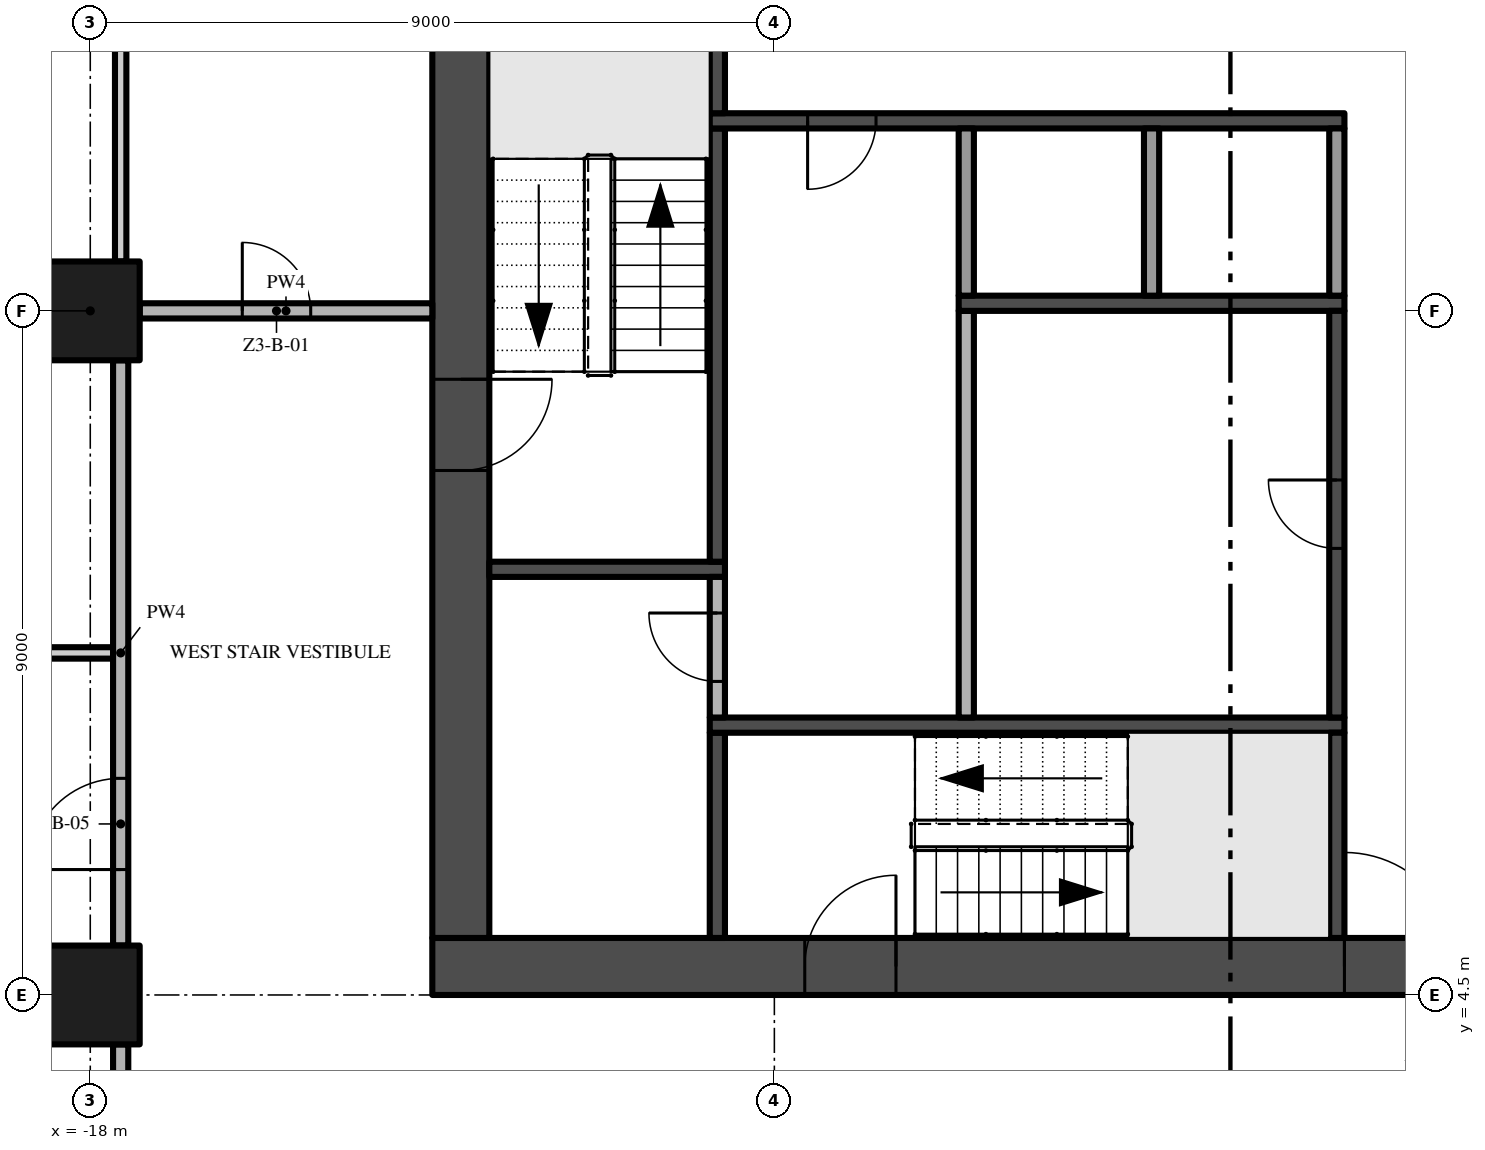
"""IFC4 building model, lengths in metres.
Left out: names, types, materials, properties, quantities, classifications, styles, units other than length and angle.
Written with IfcOpenShell. Run it as: python <this file> out.ifc"""

import sys

from ifc_helpers import new_model, si_unit, direction, frame, frame_2d, origin, origin_2d, place, context, subcontext, project, spatial, rectangle, extrude, element, fill, save


model = new_model("IFC4")
c1 = context("Model", 3, precision=1e-05, world=origin(), true_north=direction((0.0, 1.0)))
c2 = subcontext(c1, "Body", "Model", "MODEL_VIEW")
j1 = project(units=[si_unit("LENGTHUNIT", "METRE"), si_unit("PLANEANGLEUNIT", "RADIAN")], contexts=[c1])
p1 = place(None, origin())
s1 = spatial("IfcSite", under=j1, at=p1, CompositionType="ELEMENT")
p2 = place(p1, origin())
s2 = spatial("IfcBuilding", under=s1, at=p2, CompositionType="ELEMENT")
p3 = place(p2, frame((0.0, 0.0, 136.4)))
s3 = spatial("IfcBuildingStorey", under=s2, at=p3, CompositionType="ELEMENT", Elevation=136.4)
p4 = place(p3, frame((-13.5, 4.875, -0.3), z_axis=(0.0, 0.0, 1.0), x_axis=(1.0, 0.0, 0.0)))
e1 = element("IfcWall", 1, at=p4, inside=s3, PredefinedType="SHEAR", context=c2, shape_type="SweptSolid", body=[
    extrude(rectangle(XDim=27.0, YDim=0.75, at=frame_2d((13.5, 0.0))), origin(), (0.0, 0.0, 1.0), 3.8),
])
p5 = place(p4, frame((12.0, 0.0, 0.3)))
e2 = element("IfcOpeningElement", 2, at=p5, cuts=e1, PredefinedType="OPENING", context=c2, shape_type="SweptSolid", body=[
    extrude(rectangle(XDim=3.0, YDim=2.4, at=frame_2d((1.5, 1.2))), frame((0.0, 0.385, 0.0), z_axis=(0.0, -1.0, 0.0), x_axis=(1.0, 0.0, 0.0)), (0.0, 0.0, 1.0), 0.77),
])
p6 = place(p4, frame((4.9, 0.0, 0.3)))
e3 = element("IfcOpeningElement", 3, at=p6, cuts=e1, PredefinedType="OPENING", context=c2, shape_type="SweptSolid", body=[
    extrude(rectangle(XDim=1.2, YDim=2.2, at=frame_2d((0.6, 1.1))), frame((0.0, 0.385, 0.0), z_axis=(0.0, -1.0, 0.0), x_axis=(1.0, 0.0, 0.0)), (0.0, 0.0, 1.0), 0.77),
])
p7 = place(p4, frame((20.75, 0.0, 0.3)))
e4 = element("IfcOpeningElement", 4, at=p7, cuts=e1, PredefinedType="OPENING", context=c2, shape_type="SweptSolid", body=[
    extrude(rectangle(XDim=1.5, YDim=2.2, at=frame_2d((0.75, 1.1))), frame((0.0, 0.385, 0.0), z_axis=(0.0, -1.0, 0.0), x_axis=(1.0, 0.0, 0.0)), (0.0, 0.0, 1.0), 0.77),
])
p8 = place(p4, frame((17.4, 0.0, 0.3)))
e5 = element("IfcOpeningElement", 5, at=p8, cuts=e1, PredefinedType="OPENING", context=c2, shape_type="SweptSolid", body=[
    extrude(rectangle(XDim=1.2, YDim=2.2, at=frame_2d((0.6, 1.1))), frame((0.0, 0.385, 0.0), z_axis=(0.0, -1.0, 0.0), x_axis=(1.0, 0.0, 0.0)), (0.0, 0.0, 1.0), 0.77),
])
p9 = place(p3, frame((-13.125, 21.75, -0.3), z_axis=(0.0, 0.0, 1.0), x_axis=(0.0, -1.0, 0.0)))
e6 = element("IfcWall", 6, at=p9, inside=s3, PredefinedType="SHEAR", context=c2, shape_type="SweptSolid", body=[
    extrude(rectangle(XDim=16.5, YDim=0.75, at=frame_2d((8.25, 0.0))), origin(), (0.0, 0.0, 1.0), 3.8),
])
p10 = place(p9, frame((9.15, 0.0, 0.3)))
e7 = element("IfcOpeningElement", 7, at=p10, cuts=e6, PredefinedType="OPENING", context=c2, shape_type="SweptSolid", body=[
    extrude(rectangle(XDim=1.2, YDim=2.2, at=frame_2d((0.6, 1.1))), frame((0.0, 0.385, 0.0), z_axis=(0.0, -1.0, 0.0), x_axis=(1.0, 0.0, 0.0)), (0.0, 0.0, 1.0), 0.77),
])
for number, where, z_axis, x_axis in (
    (8, (-18.0, 13.5, 0.0), (0.0, 0.0, 1.0), (1.0, 0.0, 0.0)),
    (9, (-18.0, 4.5, 0.0), (0.0, 0.0, 1.0), (1.0, 0.0, 0.0)),
):
    element("IfcColumn", number, at=place(p3, frame(where, z_axis=z_axis, x_axis=x_axis)), inside=s3, PredefinedType="COLUMN", context=c2, shape_type="SweptSolid", body=[
        extrude(rectangle(XDim=1.3, YDim=1.3, at=origin_2d()), origin(), (0.0, 0.0, 1.0), 3.5),
    ])
p11 = place(p3, frame((-12.75, 10.1, 0.0), z_axis=(0.0, 0.0, 1.0), x_axis=(1.0, 0.0, 0.0)))
e10 = element("IfcWall", 10, at=p11, inside=s3, PredefinedType="SHEAR", context=c2, shape_type="SweptSolid", body=[
    extrude(rectangle(XDim=3.1, YDim=0.2, at=frame_2d((1.55, 0.0))), origin(), (0.0, 0.0, 1.0), 3.5),
])
p12 = place(p3, frame((-9.75, 5.25, 0.0), z_axis=(0.0, 0.0, 1.0), x_axis=(0.0, 1.0, 0.0)))
e11 = element("IfcWall", 11, at=p12, inside=s3, PredefinedType="SHEAR", context=c2, shape_type="SweptSolid", body=[
    extrude(rectangle(XDim=2.7, YDim=0.2, at=frame_2d((1.35, 0.0))), origin(), (0.0, 0.0, 1.0), 3.5),
])
p13 = place(p3, frame((-9.85, 8.05, 0.0), z_axis=(0.0, 0.0, 1.0), x_axis=(1.0, 0.0, 0.0)))
e12 = element("IfcWall", 12, at=p13, inside=s3, PredefinedType="SHEAR", context=c2, shape_type="SweptSolid", body=[
    extrude(rectangle(XDim=8.35, YDim=0.2, at=frame_2d((4.175, 0.0))), origin(), (0.0, 0.0, 1.0), 3.5),
])
p14 = place(p3, frame((-9.75, 8.15, 0.0), z_axis=(0.0, 0.0, 1.0), x_axis=(0.0, 1.0, 0.0)))
e13 = element("IfcWall", 13, at=p14, inside=s3, PredefinedType="PARTITIONING", context=c2, shape_type="SweptSolid", body=[
    extrude(rectangle(XDim=1.85, YDim=0.2, at=frame_2d((0.925, 0.0))), origin(), (0.0, 0.0, 1.0), 3.5),
])
p15 = place(p14, frame((0.475, 0.0, 0.0)))
e14 = element("IfcOpeningElement", 14, at=p15, cuts=e13, PredefinedType="OPENING", context=c2, shape_type="SweptSolid", body=[
    extrude(rectangle(XDim=0.9, YDim=2.1, at=frame_2d((0.45, 1.05))), frame((0.0, 0.11, 0.0), z_axis=(0.0, -1.0, 0.0), x_axis=(1.0, 0.0, 0.0)), (0.0, 0.0, 1.0), 0.22),
])
p16 = place(p3, frame((-9.75, 10.2, 0.0), z_axis=(0.0, 0.0, 1.0), x_axis=(0.0, 1.0, 0.0)))
e15 = element("IfcWall", 15, at=p16, inside=s3, PredefinedType="SHEAR", context=c2, shape_type="SweptSolid", body=[
    extrude(rectangle(XDim=5.7, YDim=0.2, at=frame_2d((2.85, 0.0))), origin(), (0.0, 0.0, 1.0), 3.5),
])
p17 = place(p3, frame((-1.5, 16.0, 0.0), z_axis=(0.0, 0.0, 1.0), x_axis=(-1.0, 0.0, 0.0)))
e16 = element("IfcWall", 16, at=p17, inside=s3, PredefinedType="SHEAR", context=c2, shape_type="SweptSolid", body=[
    extrude(rectangle(XDim=8.35, YDim=0.2, at=frame_2d((4.175, 0.0))), origin(), (0.0, 0.0, 1.0), 3.5),
])
p18 = place(p17, frame((6.162, 0.0, 0.0)))
e17 = element("IfcOpeningElement", 17, at=p18, cuts=e16, PredefinedType="OPENING", context=c2, shape_type="SweptSolid", body=[
    extrude(rectangle(XDim=0.9, YDim=2.1, at=frame_2d((0.45, 1.05))), frame((0.0, 0.11, 0.0), z_axis=(0.0, -1.0, 0.0), x_axis=(1.0, 0.0, 0.0)), (0.0, 0.0, 1.0), 0.22),
])
p19 = place(p3, frame((-9.75, 16.1, 0.0), z_axis=(0.0, 0.0, 1.0), x_axis=(0.0, 1.0, 0.0)))
e18 = element("IfcWall", 18, at=p19, inside=s3, PredefinedType="SHEAR", context=c2, shape_type="SweptSolid", body=[
    extrude(rectangle(XDim=1.5, YDim=0.2, at=frame_2d((0.75, 0.0))), origin(), (0.0, 0.0, 1.0), 3.5),
])
p20 = place(p3, frame((-6.475, 8.15, 0.0), z_axis=(0.0, 0.0, 1.0), x_axis=(0.0, 1.0, 0.0)))
e19 = element("IfcWall", 19, at=p20, inside=s3, PredefinedType="PARTITIONING", context=c2, shape_type="SweptSolid", body=[
    extrude(rectangle(XDim=5.35, YDim=0.2, at=frame_2d((2.675, 0.0))), origin(), (0.0, 0.0, 1.0), 3.5),
])
p21 = place(p3, frame((-6.575, 13.6, 0.0), z_axis=(0.0, 0.0, 1.0), x_axis=(1.0, 0.0, 0.0)))
e20 = element("IfcWall", 20, at=p21, inside=s3, PredefinedType="SHEAR", context=c2, shape_type="SweptSolid", body=[
    extrude(rectangle(XDim=5.075, YDim=0.2, at=frame_2d((2.538, 0.0))), origin(), (0.0, 0.0, 1.0), 3.5),
])
for number, where, z_axis, x_axis in (
    (21, (-6.475, 13.7, 0.0), (0.0, 0.0, 1.0), (0.0, 1.0, 0.0)),
    (22, (-4.037, 13.7, 0.0), (0.0, 0.0, 1.0), (0.0, 1.0, 0.0)),
):
    element("IfcWall", number, at=place(p3, frame(where, z_axis=z_axis, x_axis=x_axis)), inside=s3, PredefinedType="PARTITIONING", context=c2, shape_type="SweptSolid", body=[
        extrude(rectangle(XDim=2.2, YDim=0.2, at=frame_2d((1.1, 0.0))), origin(), (0.0, 0.0, 1.0), 3.5),
    ])
p22 = place(p3, frame((-1.6, 5.25, 0.0), z_axis=(0.0, 0.0, 1.0), x_axis=(0.0, 1.0, 0.0)))
e23 = element("IfcWall", 23, at=p22, inside=s3, PredefinedType="SHEAR", context=c2, shape_type="SweptSolid", body=[
    extrude(rectangle(XDim=2.7, YDim=0.2, at=frame_2d((1.35, 0.0))), origin(), (0.0, 0.0, 1.0), 3.5),
])
p23 = place(p3, frame((-1.6, 8.15, 0.0), z_axis=(0.0, 0.0, 1.0), x_axis=(0.0, 1.0, 0.0)))
e24 = element("IfcWall", 24, at=p23, inside=s3, PredefinedType="SHEAR", context=c2, shape_type="SweptSolid", body=[
    extrude(rectangle(XDim=5.35, YDim=0.2, at=frame_2d((2.675, 0.0))), origin(), (0.0, 0.0, 1.0), 3.5),
])
p24 = place(p23, frame((2.225, 0.0, 0.0)))
e25 = element("IfcOpeningElement", 25, at=p24, cuts=e24, PredefinedType="OPENING", context=c2, shape_type="SweptSolid", body=[
    extrude(rectangle(XDim=0.9, YDim=2.1, at=frame_2d((0.45, 1.05))), frame((0.0, 0.11, 0.0), z_axis=(0.0, -1.0, 0.0), x_axis=(1.0, 0.0, 0.0)), (0.0, 0.0, 1.0), 0.22),
])
p25 = place(p3, frame((-1.6, 13.7, 0.0), z_axis=(0.0, 0.0, 1.0), x_axis=(0.0, 1.0, 0.0)))
e26 = element("IfcWall", 26, at=p25, inside=s3, PredefinedType="PARTITIONING", context=c2, shape_type="SweptSolid", body=[
    extrude(rectangle(XDim=2.2, YDim=0.2, at=frame_2d((1.1, 0.0))), origin(), (0.0, 0.0, 1.0), 3.5),
])
p26 = place(p3, frame((-22.2, 9.0, 0.0), z_axis=(0.0, 0.0, 1.0), x_axis=(1.0, 0.0, 0.0)))
e27 = element("IfcWall", 27, at=p26, inside=s3, PredefinedType="PARTITIONING", context=c2, shape_type="SweptSolid", body=[
    extrude(rectangle(XDim=4.5, YDim=0.15, at=frame_2d((2.25, 0.0))), origin(), (0.0, 0.0, 1.0), 3.5),
])
p27 = place(p26, frame((1.25, 0.0, 0.0)))
e28 = element("IfcOpeningElement", 28, at=p27, cuts=e27, PredefinedType="OPENING", context=c2, shape_type="SweptSolid", body=[
    extrude(rectangle(XDim=1.8, YDim=2.4, at=frame_2d((0.9, 1.2))), frame((0.0, 0.085, 0.0), z_axis=(0.0, -1.0, 0.0), x_axis=(1.0, 0.0, 0.0)), (0.0, 0.0, 1.0), 0.17),
])
p28 = place(p3, frame((-17.35, 13.5, 0.0), z_axis=(0.0, 0.0, 1.0), x_axis=(1.0, 0.0, 0.0)))
e29 = element("IfcWall", 29, at=p28, inside=s3, PredefinedType="PARTITIONING", context=c2, shape_type="SweptSolid", body=[
    extrude(rectangle(XDim=3.85, YDim=0.2, at=frame_2d((1.925, 0.0))), origin(), (0.0, 0.0, 1.0), 3.5),
])
p29 = place(p28, frame((1.35, 0.0, 0.0)))
e30 = element("IfcOpeningElement", 30, at=p29, cuts=e29, PredefinedType="OPENING", context=c2, shape_type="SweptSolid", body=[
    extrude(rectangle(XDim=0.9, YDim=2.1, at=frame_2d((0.45, 1.05))), frame((0.0, 0.11, 0.0), z_axis=(0.0, -1.0, 0.0), x_axis=(1.0, 0.0, 0.0)), (0.0, 0.0, 1.0), 0.22),
])
p30 = place(p3, frame((-17.6, -0.2, 0.0), z_axis=(0.0, 0.0, 1.0), x_axis=(0.0, 1.0, 0.0)))
e31 = element("IfcWall", 31, at=p30, inside=s3, PredefinedType="PARTITIONING", context=c2, shape_type="SweptSolid", body=[
    extrude(rectangle(XDim=4.05, YDim=0.2, at=frame_2d((2.025, 0.0))), origin(), (0.0, 0.0, 1.0), 3.5),
])
p31 = place(p3, frame((-17.6, 5.15, 0.0), z_axis=(0.0, 0.0, 1.0), x_axis=(0.0, 1.0, 0.0)))
e32 = element("IfcWall", 32, at=p31, inside=s3, PredefinedType="PARTITIONING", context=c2, shape_type="SweptSolid", body=[
    extrude(rectangle(XDim=7.7, YDim=0.2, at=frame_2d((3.85, 0.0))), origin(), (0.0, 0.0, 1.0), 3.5),
])
p32 = place(p31, frame((1.0, 0.0, 0.0)))
e33 = element("IfcOpeningElement", 33, at=p32, cuts=e32, PredefinedType="OPENING", context=c2, shape_type="SweptSolid", body=[
    extrude(rectangle(XDim=1.2, YDim=2.4, at=frame_2d((0.6, 1.2))), frame((0.0, 0.11, 0.0), z_axis=(0.0, -1.0, 0.0), x_axis=(1.0, 0.0, 0.0)), (0.0, 0.0, 1.0), 0.22),
])
p33 = place(p3, frame((-17.6, 14.15, 0.0), z_axis=(0.0, 0.0, 1.0), x_axis=(0.0, 1.0, 0.0)))
e34 = element("IfcWall", 34, at=p33, inside=s3, PredefinedType="PARTITIONING", context=c2, shape_type="SweptSolid", body=[
    extrude(rectangle(XDim=3.25, YDim=0.15, at=frame_2d((1.625, 0.0))), origin(), (0.0, 0.0, 1.0), 3.5),
])
p34 = place(p5, frame((3.0, 0.0, 0.0), z_axis=(0.0, 0.0, 1.0), x_axis=(-1.0, 0.0, 0.0)))
e35 = element("IfcDoor", 35, at=p34, inside=s3, OperationType="DOUBLE_DOOR_SINGLE_SWING", PredefinedType="DOOR", context=c2, shape_type="SweptSolid", body=[
    extrude(rectangle(XDim=3.0, YDim=2.4, at=frame_2d((1.5, 1.2))), frame((0.0, 0.025, 0.0), z_axis=(0.0, -1.0, 0.0), x_axis=(1.0, 0.0, 0.0)), (0.0, 0.0, 1.0), 0.05),
])
fill(e2, e35)
p35 = place(p10, frame((1.2, 0.0, 0.0), z_axis=(0.0, 0.0, 1.0), x_axis=(-1.0, 0.0, 0.0)))
e36 = element("IfcDoor", 36, at=p35, inside=s3, OperationType="SINGLE_SWING_RIGHT", PredefinedType="DOOR", context=c2, shape_type="SweptSolid", body=[
    extrude(rectangle(XDim=1.2, YDim=2.2, at=frame_2d((0.6, 1.1))), frame((0.0, 0.025, 0.0), z_axis=(0.0, -1.0, 0.0), x_axis=(1.0, 0.0, 0.0)), (0.0, 0.0, 1.0), 0.05),
])
fill(e7, e36)
p36 = place(p6, frame((1.2, 0.0, 0.0), z_axis=(0.0, 0.0, 1.0), x_axis=(-1.0, 0.0, 0.0)))
e37 = element("IfcDoor", 37, at=p36, inside=s3, OperationType="SINGLE_SWING_LEFT", PredefinedType="DOOR", context=c2, shape_type="SweptSolid", body=[
    extrude(rectangle(XDim=1.2, YDim=2.2, at=frame_2d((0.6, 1.1))), frame((0.0, 0.025, 0.0), z_axis=(0.0, -1.0, 0.0), x_axis=(1.0, 0.0, 0.0)), (0.0, 0.0, 1.0), 0.05),
])
fill(e3, e37)
p37 = place(p18, origin())
e38 = element("IfcDoor", 38, at=p37, inside=s3, OperationType="SINGLE_SWING_RIGHT", PredefinedType="DOOR", context=c2, shape_type="SweptSolid", body=[
    extrude(rectangle(XDim=0.9, YDim=2.1, at=frame_2d((0.45, 1.05))), frame((0.0, 0.025, 0.0), z_axis=(0.0, -1.0, 0.0), x_axis=(1.0, 0.0, 0.0)), (0.0, 0.0, 1.0), 0.05),
])
fill(e17, e38)
p38 = place(p24, origin())
e39 = element("IfcDoor", 39, at=p38, inside=s3, OperationType="SINGLE_SWING_RIGHT", PredefinedType="DOOR", context=c2, shape_type="SweptSolid", body=[
    extrude(rectangle(XDim=0.9, YDim=2.1, at=frame_2d((0.45, 1.05))), frame((0.0, 0.025, 0.0), z_axis=(0.0, -1.0, 0.0), x_axis=(1.0, 0.0, 0.0)), (0.0, 0.0, 1.0), 0.05),
])
fill(e25, e39)
p39 = place(p15, origin())
e40 = element("IfcDoor", 40, at=p39, inside=s3, OperationType="SINGLE_SWING_RIGHT", PredefinedType="DOOR", context=c2, shape_type="SweptSolid", body=[
    extrude(rectangle(XDim=0.9, YDim=2.1, at=frame_2d((0.45, 1.05))), frame((0.0, 0.025, 0.0), z_axis=(0.0, -1.0, 0.0), x_axis=(1.0, 0.0, 0.0)), (0.0, 0.0, 1.0), 0.05),
])
fill(e14, e40)
p40 = place(p29, origin())
e41 = element("IfcDoor", 41, at=p40, inside=s3, OperationType="SINGLE_SWING_LEFT", PredefinedType="DOOR", context=c2, shape_type="SweptSolid", body=[
    extrude(rectangle(XDim=0.9, YDim=2.1, at=frame_2d((0.45, 1.05))), frame((0.0, 0.025, 0.0), z_axis=(0.0, -1.0, 0.0), x_axis=(1.0, 0.0, 0.0)), (0.0, 0.0, 1.0), 0.05),
])
fill(e30, e41)
p41 = place(p32, origin())
e42 = element("IfcDoor", 42, at=p41, inside=s3, OperationType="SINGLE_SWING_LEFT", PredefinedType="DOOR", context=c2, shape_type="SweptSolid", body=[
    extrude(rectangle(XDim=1.2, YDim=2.4, at=frame_2d((0.6, 1.2))), frame((0.0, 0.025, 0.0), z_axis=(0.0, -1.0, 0.0), x_axis=(1.0, 0.0, 0.0)), (0.0, 0.0, 1.0), 0.05),
])
fill(e33, e42)
save(model, sys.argv[1])
